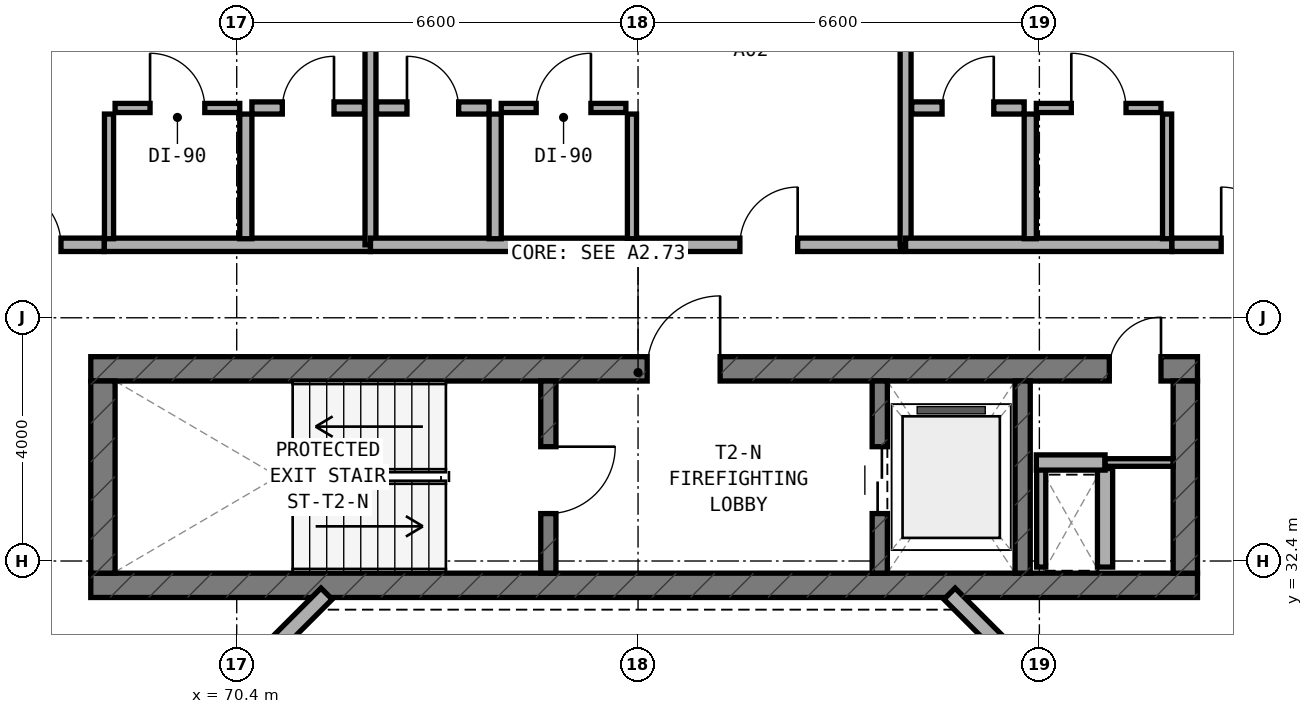
"""IFC4 building model, lengths in metres.
Left out: names, types, materials, properties, quantities, classifications, styles, units other than length and angle.
Written with IfcOpenShell. Run it as: python <this file> out.ifc"""

import sys

from ifc_helpers import new_model, si_unit, direction, frame, frame_2d, origin, place, context, subcontext, project, spatial, rectangle, extrude, element, fill, save


model = new_model("IFC4")
c1 = context("Model", 3, precision=1e-05, world=origin(), true_north=direction((0.0, 1.0)))
c2 = subcontext(c1, "Body", "Model", "MODEL_VIEW")
j1 = project(units=[si_unit("LENGTHUNIT", "METRE"), si_unit("PLANEANGLEUNIT", "RADIAN")], contexts=[c1])
p1 = place(None, origin())
s1 = spatial("IfcSite", under=j1, at=p1, CompositionType="ELEMENT")
p2 = place(p1, origin())
s2 = spatial("IfcBuilding", under=s1, at=p2, CompositionType="ELEMENT")
p3 = place(p2, frame((0.0, 0.0, 98.5)))
s3 = spatial("IfcBuildingStorey", under=s2, at=p3, CompositionType="ELEMENT", Elevation=98.5)
p4 = place(p3, frame((68.0, 32.0, 0.0), z_axis=(0.0, 0.0, 1.0), x_axis=(1.0, 0.0, 0.0)))
e1 = element("IfcWall", 1, at=p4, inside=s3, PredefinedType="SHEAR", context=c2, shape_type="SweptSolid", body=[
    extrude(rectangle(XDim=18.2, YDim=0.4, at=frame_2d((9.1, 0.0))), origin(), (0.0, 0.0, 1.0), 3.5),
])
p5 = place(p3, frame((68.0, 35.56, 0.0), z_axis=(0.0, 0.0, 1.0), x_axis=(1.0, 0.0, 0.0)))
e2 = element("IfcWall", 2, at=p5, inside=s3, PredefinedType="SHEAR", context=c2, shape_type="SweptSolid", body=[
    extrude(rectangle(XDim=18.2, YDim=0.4, at=frame_2d((9.1, 0.0))), origin(), (0.0, 0.0, 1.0), 3.5),
])
p6 = place(p5, frame((9.15, 0.0, 0.0)))
e3 = element("IfcOpeningElement", 3, at=p6, cuts=e2, PredefinedType="OPENING", context=c2, shape_type="SweptSolid", body=[
    extrude(rectangle(XDim=1.2, YDim=2.15, at=frame_2d((0.6, 1.075))), frame((0.0, 0.21, 0.0), z_axis=(0.0, -1.0, 0.0), x_axis=(1.0, 0.0, 0.0)), (0.0, 0.0, 1.0), 0.42),
])
p7 = place(p5, frame((16.75, 0.0, 0.0)))
e4 = element("IfcOpeningElement", 4, at=p7, cuts=e2, PredefinedType="OPENING", context=c2, shape_type="SweptSolid", body=[
    extrude(rectangle(XDim=0.85, YDim=2.1, at=frame_2d((0.425, 1.05))), frame((0.0, 0.21, 0.0), z_axis=(0.0, -1.0, 0.0), x_axis=(1.0, 0.0, 0.0)), (0.0, 0.0, 1.0), 0.42),
])
for number, where, z_axis, x_axis in (
    (5, (68.2, 32.2, 0.0), (0.0, 0.0, 1.0), (0.0, 1.0, 0.0)),
    (6, (86.0, 32.2, 0.0), (0.0, 0.0, 1.0), (0.0, 1.0, 0.0)),
):
    element("IfcWall", number, at=place(p3, frame(where, z_axis=z_axis, x_axis=x_axis)), inside=s3, PredefinedType="SHEAR", context=c2, shape_type="SweptSolid", body=[
        extrude(rectangle(XDim=3.16, YDim=0.4, at=frame_2d((1.58, 0.0))), origin(), (0.0, 0.0, 1.0), 3.5),
    ])
p8 = place(p3, frame((75.525, 32.2, 0.0), z_axis=(0.0, 0.0, 1.0), x_axis=(0.0, 1.0, 0.0)))
e7 = element("IfcWall", 7, at=p8, inside=s3, PredefinedType="STANDARD", context=c2, shape_type="SweptSolid", body=[
    extrude(rectangle(XDim=3.16, YDim=0.25, at=frame_2d((1.58, 0.0))), origin(), (0.0, 0.0, 1.0), 3.25),
])
p9 = place(p8, frame((0.98, 0.0, 0.0)))
e8 = element("IfcOpeningElement", 8, at=p9, cuts=e7, PredefinedType="OPENING", context=c2, shape_type="SweptSolid", body=[
    extrude(rectangle(XDim=1.1, YDim=2.15, at=frame_2d((0.55, 1.075))), frame((0.0, 0.135, 0.0), z_axis=(0.0, -1.0, 0.0), x_axis=(1.0, 0.0, 0.0)), (0.0, 0.0, 1.0), 0.27),
])
p10 = place(p3, frame((80.975, 32.2, 0.0), z_axis=(0.0, 0.0, 1.0), x_axis=(0.0, 1.0, 0.0)))
e9 = element("IfcWall", 9, at=p10, inside=s3, PredefinedType="STANDARD", context=c2, shape_type="SweptSolid", body=[
    extrude(rectangle(XDim=3.16, YDim=0.25, at=frame_2d((1.58, 0.0))), origin(), (0.0, 0.0, 1.0), 3.25),
])
p11 = place(p10, frame((0.98, 0.0, 0.0)))
e10 = element("IfcOpeningElement", 10, at=p11, cuts=e9, PredefinedType="OPENING", context=c2, shape_type="SweptSolid", body=[
    extrude(rectangle(XDim=1.1, YDim=2.15, at=frame_2d((0.55, 1.075))), frame((0.0, 0.135, 0.0), z_axis=(0.0, -1.0, 0.0), x_axis=(1.0, 0.0, 0.0)), (0.0, 0.0, 1.0), 0.27),
])
p12 = place(p3, frame((83.325, 32.2, 0.0), z_axis=(0.0, 0.0, 1.0), x_axis=(0.0, 1.0, 0.0)))
e11 = element("IfcWall", 11, at=p12, inside=s3, PredefinedType="STANDARD", context=c2, shape_type="SweptSolid", body=[
    extrude(rectangle(XDim=3.16, YDim=0.25, at=frame_2d((1.58, 0.0))), origin(), (0.0, 0.0, 1.0), 3.25),
])
for number, where, z_axis, x_axis in (
    (12, (83.756, 30.228, 0.0), (0.0, 0.0, 1.0), (-0.707, 0.707, 0.0)),
    (13, (71.878, 31.862, 0.0), (0.0, 0.0, 1.0), (-0.707, -0.707, 0.0)),
):
    element("IfcWall", number, at=place(p3, frame(where, z_axis=z_axis, x_axis=x_axis)), inside=s3, PredefinedType="STANDARD", context=c2, shape_type="SweptSolid", body=[
        extrude(rectangle(XDim=2.311, YDim=0.26, at=frame_2d((1.155, 0.0))), origin(), (0.0, 0.0, 1.0), 3.25),
    ])
p13 = place(p3, frame((83.63, 32.3, 0.0), z_axis=(0.0, 0.0, 1.0), x_axis=(0.0, 1.0, 0.0)))
e14 = element("IfcWall", 14, at=p13, inside=s3, PredefinedType="PARTITIONING", context=c2, shape_type="SweptSolid", body=[
    extrude(rectangle(XDim=1.62, YDim=0.15, at=frame_2d((0.81, 0.0))), origin(), (0.0, 0.0, 1.0), 2.825),
])
p14 = place(p3, frame((84.68, 32.3, 0.0), z_axis=(0.0, 0.0, 1.0), x_axis=(0.0, 1.0, 0.0)))
e15 = element("IfcWall", 15, at=p14, inside=s3, PredefinedType="SOLIDWALL", context=c2, shape_type="SweptSolid", body=[
    extrude(rectangle(XDim=1.62, YDim=0.25, at=frame_2d((0.81, 0.0))), origin(), (0.0, 0.0, 1.0), 3.22),
])
p15 = place(p3, frame((83.55, 34.02, 0.0), z_axis=(0.0, 0.0, 1.0), x_axis=(1.0, 0.0, 0.0)))
e16 = element("IfcWall", 16, at=p15, inside=s3, PredefinedType="SOLIDWALL", context=c2, shape_type="SweptSolid", body=[
    extrude(rectangle(XDim=1.13, YDim=0.25, at=frame_2d((0.565, 0.0))), origin(), (0.0, 0.0, 1.0), 3.22),
])
p16 = place(p3, frame((84.68, 34.02, 0.0), z_axis=(0.0, 0.0, 1.0), x_axis=(1.0, 0.0, 0.0)))
e17 = element("IfcWall", 17, at=p16, inside=s3, PredefinedType="PARTITIONING", context=c2, shape_type="SweptSolid", body=[
    extrude(rectangle(XDim=1.12, YDim=0.125, at=frame_2d((0.56, 0.0))), origin(), (0.0, 0.0, 1.0), 3.22),
])
p17 = place(p3, frame((68.22, 37.6, 0.0), z_axis=(0.0, 0.0, 1.0), x_axis=(1.0, 0.0, 0.0)))
e18 = element("IfcWall", 18, at=p17, inside=s3, PredefinedType="SOLIDWALL", context=c2, shape_type="SweptSolid", body=[
    extrude(rectangle(XDim=4.38, YDim=0.22, at=frame_2d((2.19, 0.0))), origin(), (0.0, 0.0, 1.0), 2.825),
])
p18 = place(p3, frame((65.85, 37.6, 0.0), z_axis=(0.0, 0.0, 1.0), x_axis=(1.0, 0.0, 0.0)))
e19 = element("IfcWall", 19, at=p18, inside=s3, PredefinedType="SOLIDWALL", context=c2, shape_type="SweptSolid", body=[
    extrude(rectangle(XDim=2.37, YDim=0.22, at=frame_2d((1.185, 0.0))), origin(), (0.0, 0.0, 1.0), 3.22),
])
p19 = place(p18, frame((0.71, 0.0, 0.0)))
e20 = element("IfcOpeningElement", 20, at=p19, cuts=e19, PredefinedType="OPENING", context=c2, shape_type="SweptSolid", body=[
    extrude(rectangle(XDim=0.95, YDim=2.1, at=frame_2d((0.475, 1.05))), frame((0.0, 0.12, 0.0), z_axis=(0.0, -1.0, 0.0), x_axis=(1.0, 0.0, 0.0)), (0.0, 0.0, 1.0), 0.24),
])
p20 = place(p3, frame((70.55, 37.7, 0.0), z_axis=(0.0, 0.0, 1.0), x_axis=(0.0, 1.0, 0.0)))
e21 = element("IfcWall", 21, at=p20, inside=s3, PredefinedType="PLUMBINGWALL", context=c2, shape_type="SweptSolid", body=[
    extrude(rectangle(XDim=2.05, YDim=0.2, at=frame_2d((1.025, 0.0))), origin(), (0.0, 0.0, 1.0), 3.22),
])
p21 = place(p3, frame((68.3, 37.7, 0.0), z_axis=(0.0, 0.0, 1.0), x_axis=(0.0, 1.0, 0.0)))
e22 = element("IfcWall", 22, at=p21, inside=s3, PredefinedType="PARTITIONING", context=c2, shape_type="SweptSolid", body=[
    extrude(rectangle(XDim=2.05, YDim=0.15, at=frame_2d((1.025, 0.0))), origin(), (0.0, 0.0, 1.0), 3.22),
])
p22 = place(p3, frame((70.65, 39.85, 0.0), z_axis=(0.0, 0.0, 1.0), x_axis=(1.0, 0.0, 0.0)))
e23 = element("IfcWall", 23, at=p22, inside=s3, PredefinedType="PLUMBINGWALL", context=c2, shape_type="SweptSolid", body=[
    extrude(rectangle(XDim=1.85, YDim=0.2, at=frame_2d((0.925, 0.0))), origin(), (0.0, 0.0, 1.0), 3.22),
])
p23 = place(p22, frame((0.5, 0.0, 0.0)))
e24 = element("IfcOpeningElement", 24, at=p23, cuts=e23, PredefinedType="OPENING", context=c2, shape_type="SweptSolid", body=[
    extrude(rectangle(XDim=0.85, YDim=2.1, at=frame_2d((0.425, 1.05))), frame((0.0, 0.11, 0.0), z_axis=(0.0, -1.0, 0.0), x_axis=(1.0, 0.0, 0.0)), (0.0, 0.0, 1.0), 0.22),
])
p24 = place(p3, frame((68.4, 39.85, 0.0), z_axis=(0.0, 0.0, 1.0), x_axis=(1.0, 0.0, 0.0)))
e25 = element("IfcWall", 25, at=p24, inside=s3, PredefinedType="PARTITIONING", context=c2, shape_type="SweptSolid", body=[
    extrude(rectangle(XDim=2.05, YDim=0.15, at=frame_2d((1.025, 0.0))), origin(), (0.0, 0.0, 1.0), 3.22),
])
p25 = place(p24, frame((0.575, 0.0, 0.0)))
e26 = element("IfcOpeningElement", 26, at=p25, cuts=e25, PredefinedType="OPENING", context=c2, shape_type="SweptSolid", body=[
    extrude(rectangle(XDim=0.9, YDim=2.1, at=frame_2d((0.45, 1.05))), frame((0.0, 0.085, 0.0), z_axis=(0.0, -1.0, 0.0), x_axis=(1.0, 0.0, 0.0)), (0.0, 0.0, 1.0), 0.17),
])
p26 = place(p3, frame((72.6, 37.6, 0.0), z_axis=(0.0, 0.0, 1.0), x_axis=(0.0, 1.0, 0.0)))
e27 = element("IfcWall", 27, at=p26, inside=s3, PredefinedType="SOLIDWALL", context=c2, shape_type="SweptSolid", body=[
    extrude(rectangle(XDim=5.74, YDim=0.18, at=frame_2d((2.87, 0.0))), origin(), (0.0, 0.0, 1.0), 2.825),
])
p27 = place(p3, frame((72.6, 37.6, 0.0), z_axis=(0.0, 0.0, 1.0), x_axis=(1.0, 0.0, 0.0)))
e28 = element("IfcWall", 28, at=p27, inside=s3, PredefinedType="SOLIDWALL", context=c2, shape_type="SweptSolid", body=[
    extrude(rectangle(XDim=4.38, YDim=0.22, at=frame_2d((2.19, 0.0))), origin(), (0.0, 0.0, 1.0), 2.825),
])
p28 = place(p3, frame((76.98, 37.6, 0.0), z_axis=(0.0, 0.0, 1.0), x_axis=(1.0, 0.0, 0.0)))
e29 = element("IfcWall", 29, at=p28, inside=s3, PredefinedType="SOLIDWALL", context=c2, shape_type="SweptSolid", body=[
    extrude(rectangle(XDim=4.34, YDim=0.22, at=frame_2d((2.17, 0.0))), origin(), (0.0, 0.0, 1.0), 2.825),
])
p29 = place(p28, frame((1.695, 0.0, 0.0)))
e30 = element("IfcOpeningElement", 30, at=p29, cuts=e29, PredefinedType="OPENING", context=c2, shape_type="SweptSolid", body=[
    extrude(rectangle(XDim=0.95, YDim=2.1, at=frame_2d((0.475, 1.05))), frame((0.0, 0.12, 0.0), z_axis=(0.0, -1.0, 0.0), x_axis=(1.0, 0.0, 0.0)), (0.0, 0.0, 1.0), 0.24),
])
p30 = place(p3, frame((74.65, 37.7, 0.0), z_axis=(0.0, 0.0, 1.0), x_axis=(0.0, 1.0, 0.0)))
e31 = element("IfcWall", 31, at=p30, inside=s3, PredefinedType="PLUMBINGWALL", context=c2, shape_type="SweptSolid", body=[
    extrude(rectangle(XDim=2.05, YDim=0.2, at=frame_2d((1.025, 0.0))), origin(), (0.0, 0.0, 1.0), 2.985),
])
p31 = place(p3, frame((76.9, 37.7, 0.0), z_axis=(0.0, 0.0, 1.0), x_axis=(0.0, 1.0, 0.0)))
e32 = element("IfcWall", 32, at=p31, inside=s3, PredefinedType="PARTITIONING", context=c2, shape_type="SweptSolid", body=[
    extrude(rectangle(XDim=2.05, YDim=0.15, at=frame_2d((1.025, 0.0))), origin(), (0.0, 0.0, 1.0), 2.985),
])
p32 = place(p3, frame((72.7, 39.85, 0.0), z_axis=(0.0, 0.0, 1.0), x_axis=(1.0, 0.0, 0.0)))
e33 = element("IfcWall", 33, at=p32, inside=s3, PredefinedType="PLUMBINGWALL", context=c2, shape_type="SweptSolid", body=[
    extrude(rectangle(XDim=1.85, YDim=0.2, at=frame_2d((0.925, 0.0))), origin(), (0.0, 0.0, 1.0), 3.22),
])
p33 = place(p32, frame((0.5, 0.0, 0.0)))
e34 = element("IfcOpeningElement", 34, at=p33, cuts=e33, PredefinedType="OPENING", context=c2, shape_type="SweptSolid", body=[
    extrude(rectangle(XDim=0.85, YDim=2.1, at=frame_2d((0.425, 1.05))), frame((0.0, 0.11, 0.0), z_axis=(0.0, -1.0, 0.0), x_axis=(1.0, 0.0, 0.0)), (0.0, 0.0, 1.0), 0.22),
])
p34 = place(p3, frame((74.75, 39.85, 0.0), z_axis=(0.0, 0.0, 1.0), x_axis=(1.0, 0.0, 0.0)))
e35 = element("IfcWall", 35, at=p34, inside=s3, PredefinedType="PARTITIONING", context=c2, shape_type="SweptSolid", body=[
    extrude(rectangle(XDim=2.05, YDim=0.15, at=frame_2d((1.025, 0.0))), origin(), (0.0, 0.0, 1.0), 3.22),
])
p35 = place(p34, frame((0.575, 0.0, 0.0)))
e36 = element("IfcOpeningElement", 36, at=p35, cuts=e35, PredefinedType="OPENING", context=c2, shape_type="SweptSolid", body=[
    extrude(rectangle(XDim=0.9, YDim=2.1, at=frame_2d((0.45, 1.05))), frame((0.0, 0.085, 0.0), z_axis=(0.0, -1.0, 0.0), x_axis=(1.0, 0.0, 0.0)), (0.0, 0.0, 1.0), 0.17),
])
p36 = place(p3, frame((81.4, 37.6, 0.0), z_axis=(0.0, 0.0, 1.0), x_axis=(0.0, 1.0, 0.0)))
e37 = element("IfcWall", 37, at=p36, inside=s3, PredefinedType="SOLIDWALL", context=c2, shape_type="SweptSolid", body=[
    extrude(rectangle(XDim=5.74, YDim=0.18, at=frame_2d((2.87, 0.0))), origin(), (0.0, 0.0, 1.0), 2.825),
])
p37 = place(p3, frame((81.4, 37.6, 0.0), z_axis=(0.0, 0.0, 1.0), x_axis=(1.0, 0.0, 0.0)))
e38 = element("IfcWall", 38, at=p37, inside=s3, PredefinedType="SOLIDWALL", context=c2, shape_type="SweptSolid", body=[
    extrude(rectangle(XDim=4.38, YDim=0.22, at=frame_2d((2.19, 0.0))), origin(), (0.0, 0.0, 1.0), 2.825),
])
p38 = place(p3, frame((85.78, 37.6, 0.0), z_axis=(0.0, 0.0, 1.0), x_axis=(1.0, 0.0, 0.0)))
e39 = element("IfcWall", 39, at=p38, inside=s3, PredefinedType="SOLIDWALL", context=c2, shape_type="SweptSolid", body=[
    extrude(rectangle(XDim=2.57, YDim=0.22, at=frame_2d((1.285, 0.0))), origin(), (0.0, 0.0, 1.0), 3.22),
])
p39 = place(p38, frame((0.81, 0.0, 0.0)))
e40 = element("IfcOpeningElement", 40, at=p39, cuts=e39, PredefinedType="OPENING", context=c2, shape_type="SweptSolid", body=[
    extrude(rectangle(XDim=0.95, YDim=2.1, at=frame_2d((0.475, 1.05))), frame((0.0, 0.12, 0.0), z_axis=(0.0, -1.0, 0.0), x_axis=(1.0, 0.0, 0.0)), (0.0, 0.0, 1.0), 0.24),
])
p40 = place(p3, frame((83.45, 37.7, 0.0), z_axis=(0.0, 0.0, 1.0), x_axis=(0.0, 1.0, 0.0)))
e41 = element("IfcWall", 41, at=p40, inside=s3, PredefinedType="PLUMBINGWALL", context=c2, shape_type="SweptSolid", body=[
    extrude(rectangle(XDim=2.05, YDim=0.2, at=frame_2d((1.025, 0.0))), origin(), (0.0, 0.0, 1.0), 3.22),
])
p41 = place(p3, frame((85.7, 37.7, 0.0), z_axis=(0.0, 0.0, 1.0), x_axis=(0.0, 1.0, 0.0)))
e42 = element("IfcWall", 42, at=p41, inside=s3, PredefinedType="PARTITIONING", context=c2, shape_type="SweptSolid", body=[
    extrude(rectangle(XDim=2.05, YDim=0.15, at=frame_2d((1.025, 0.0))), origin(), (0.0, 0.0, 1.0), 3.22),
])
p42 = place(p3, frame((81.5, 39.85, 0.0), z_axis=(0.0, 0.0, 1.0), x_axis=(1.0, 0.0, 0.0)))
e43 = element("IfcWall", 43, at=p42, inside=s3, PredefinedType="PLUMBINGWALL", context=c2, shape_type="SweptSolid", body=[
    extrude(rectangle(XDim=1.85, YDim=0.2, at=frame_2d((0.925, 0.0))), origin(), (0.0, 0.0, 1.0), 2.825),
])
p43 = place(p42, frame((0.5, 0.0, 0.0)))
e44 = element("IfcOpeningElement", 44, at=p43, cuts=e43, PredefinedType="OPENING", context=c2, shape_type="SweptSolid", body=[
    extrude(rectangle(XDim=0.85, YDim=2.1, at=frame_2d((0.425, 1.05))), frame((0.0, 0.11, 0.0), z_axis=(0.0, -1.0, 0.0), x_axis=(1.0, 0.0, 0.0)), (0.0, 0.0, 1.0), 0.22),
])
p44 = place(p3, frame((83.55, 39.85, 0.0), z_axis=(0.0, 0.0, 1.0), x_axis=(1.0, 0.0, 0.0)))
e45 = element("IfcWall", 45, at=p44, inside=s3, PredefinedType="PARTITIONING", context=c2, shape_type="SweptSolid", body=[
    extrude(rectangle(XDim=2.05, YDim=0.15, at=frame_2d((1.025, 0.0))), origin(), (0.0, 0.0, 1.0), 3.22),
])
p45 = place(p44, frame((0.575, 0.0, 0.0)))
e46 = element("IfcOpeningElement", 46, at=p45, cuts=e45, PredefinedType="OPENING", context=c2, shape_type="SweptSolid", body=[
    extrude(rectangle(XDim=0.9, YDim=2.1, at=frame_2d((0.45, 1.05))), frame((0.0, 0.085, 0.0), z_axis=(0.0, -1.0, 0.0), x_axis=(1.0, 0.0, 0.0)), (0.0, 0.0, 1.0), 0.17),
])
p46 = place(p9, frame((1.1, 0.0, 0.0), z_axis=(0.0, 0.0, 1.0), x_axis=(-1.0, 0.0, 0.0)))
e47 = element("IfcDoor", 47, at=p46, inside=s3, OperationType="SINGLE_SWING_LEFT", PredefinedType="DOOR", context=c2, shape_type="SweptSolid", body=[
    extrude(rectangle(XDim=1.1, YDim=2.15, at=frame_2d((0.55, 1.075))), frame((0.0, 0.025, 0.0), z_axis=(0.0, -1.0, 0.0), x_axis=(1.0, 0.0, 0.0)), (0.0, 0.0, 1.0), 0.05),
])
fill(e8, e47)
p47 = place(p6, origin())
e48 = element("IfcDoor", 48, at=p47, inside=s3, OperationType="SINGLE_SWING_RIGHT", PredefinedType="DOOR", context=c2, shape_type="SweptSolid", body=[
    extrude(rectangle(XDim=1.2, YDim=2.15, at=frame_2d((0.6, 1.075))), frame((0.0, 0.025, 0.0), z_axis=(0.0, -1.0, 0.0), x_axis=(1.0, 0.0, 0.0)), (0.0, 0.0, 1.0), 0.05),
])
fill(e3, e48)
p48 = place(p11, origin())
e49 = element("IfcDoor", 49, at=p48, inside=s3, OperationType="DOUBLE_DOOR_SLIDING", PredefinedType="DOOR", context=c2, shape_type="SweptSolid", body=[
    extrude(rectangle(XDim=1.1, YDim=2.15, at=frame_2d((0.55, 1.075))), frame((0.0, 0.025, 0.0), z_axis=(0.0, -1.0, 0.0), x_axis=(1.0, 0.0, 0.0)), (0.0, 0.0, 1.0), 0.05),
])
fill(e10, e49)
p49 = place(p7, origin())
e50 = element("IfcDoor", 50, at=p49, inside=s3, OperationType="SINGLE_SWING_RIGHT", PredefinedType="DOOR", context=c2, shape_type="SweptSolid", body=[
    extrude(rectangle(XDim=0.85, YDim=2.1, at=frame_2d((0.425, 1.05))), frame((0.0, 0.025, 0.0), z_axis=(0.0, -1.0, 0.0), x_axis=(1.0, 0.0, 0.0)), (0.0, 0.0, 1.0), 0.05),
])
fill(e4, e50)
p50 = place(p19, origin())
e51 = element("IfcDoor", 51, at=p50, inside=s3, OperationType="SINGLE_SWING_LEFT", PredefinedType="DOOR", context=c2, shape_type="SweptSolid", body=[
    extrude(rectangle(XDim=0.95, YDim=2.1, at=frame_2d((0.475, 1.05))), frame((0.0, 0.025, 0.0), z_axis=(0.0, -1.0, 0.0), x_axis=(1.0, 0.0, 0.0)), (0.0, 0.0, 1.0), 0.05),
])
fill(e20, e51)
p51 = place(p23, origin())
e52 = element("IfcDoor", 52, at=p51, inside=s3, OperationType="SINGLE_SWING_RIGHT", PredefinedType="DOOR", context=c2, shape_type="SweptSolid", body=[
    extrude(rectangle(XDim=0.85, YDim=2.1, at=frame_2d((0.425, 1.05))), frame((0.0, 0.025, 0.0), z_axis=(0.0, -1.0, 0.0), x_axis=(1.0, 0.0, 0.0)), (0.0, 0.0, 1.0), 0.05),
])
fill(e24, e52)
p52 = place(p25, origin())
e53 = element("IfcDoor", 53, at=p52, inside=s3, OperationType="SINGLE_SWING_LEFT", PredefinedType="DOOR", context=c2, shape_type="SweptSolid", body=[
    extrude(rectangle(XDim=0.9, YDim=2.1, at=frame_2d((0.45, 1.05))), frame((0.0, 0.025, 0.0), z_axis=(0.0, -1.0, 0.0), x_axis=(1.0, 0.0, 0.0)), (0.0, 0.0, 1.0), 0.05),
])
fill(e26, e53)
p53 = place(p29, origin())
e54 = element("IfcDoor", 54, at=p53, inside=s3, OperationType="SINGLE_SWING_RIGHT", PredefinedType="DOOR", context=c2, shape_type="SweptSolid", body=[
    extrude(rectangle(XDim=0.95, YDim=2.1, at=frame_2d((0.475, 1.05))), frame((0.0, 0.025, 0.0), z_axis=(0.0, -1.0, 0.0), x_axis=(1.0, 0.0, 0.0)), (0.0, 0.0, 1.0), 0.05),
])
fill(e30, e54)
p54 = place(p33, origin())
e55 = element("IfcDoor", 55, at=p54, inside=s3, OperationType="SINGLE_SWING_LEFT", PredefinedType="DOOR", context=c2, shape_type="SweptSolid", body=[
    extrude(rectangle(XDim=0.85, YDim=2.1, at=frame_2d((0.425, 1.05))), frame((0.0, 0.025, 0.0), z_axis=(0.0, -1.0, 0.0), x_axis=(1.0, 0.0, 0.0)), (0.0, 0.0, 1.0), 0.05),
])
fill(e34, e55)
p55 = place(p35, origin())
e56 = element("IfcDoor", 56, at=p55, inside=s3, OperationType="SINGLE_SWING_RIGHT", PredefinedType="DOOR", context=c2, shape_type="SweptSolid", body=[
    extrude(rectangle(XDim=0.9, YDim=2.1, at=frame_2d((0.45, 1.05))), frame((0.0, 0.025, 0.0), z_axis=(0.0, -1.0, 0.0), x_axis=(1.0, 0.0, 0.0)), (0.0, 0.0, 1.0), 0.05),
])
fill(e36, e56)
p56 = place(p39, origin())
e57 = element("IfcDoor", 57, at=p56, inside=s3, OperationType="SINGLE_SWING_LEFT", PredefinedType="DOOR", context=c2, shape_type="SweptSolid", body=[
    extrude(rectangle(XDim=0.95, YDim=2.1, at=frame_2d((0.475, 1.05))), frame((0.0, 0.025, 0.0), z_axis=(0.0, -1.0, 0.0), x_axis=(1.0, 0.0, 0.0)), (0.0, 0.0, 1.0), 0.05),
])
fill(e40, e57)
p57 = place(p43, origin())
e58 = element("IfcDoor", 58, at=p57, inside=s3, OperationType="SINGLE_SWING_RIGHT", PredefinedType="DOOR", context=c2, shape_type="SweptSolid", body=[
    extrude(rectangle(XDim=0.85, YDim=2.1, at=frame_2d((0.425, 1.05))), frame((0.0, 0.025, 0.0), z_axis=(0.0, -1.0, 0.0), x_axis=(1.0, 0.0, 0.0)), (0.0, 0.0, 1.0), 0.05),
])
fill(e44, e58)
p58 = place(p45, origin())
e59 = element("IfcDoor", 59, at=p58, inside=s3, OperationType="SINGLE_SWING_LEFT", PredefinedType="DOOR", context=c2, shape_type="SweptSolid", body=[
    extrude(rectangle(XDim=0.9, YDim=2.1, at=frame_2d((0.45, 1.05))), frame((0.0, 0.025, 0.0), z_axis=(0.0, -1.0, 0.0), x_axis=(1.0, 0.0, 0.0)), (0.0, 0.0, 1.0), 0.05),
])
fill(e46, e59)
save(model, sys.argv[1])
